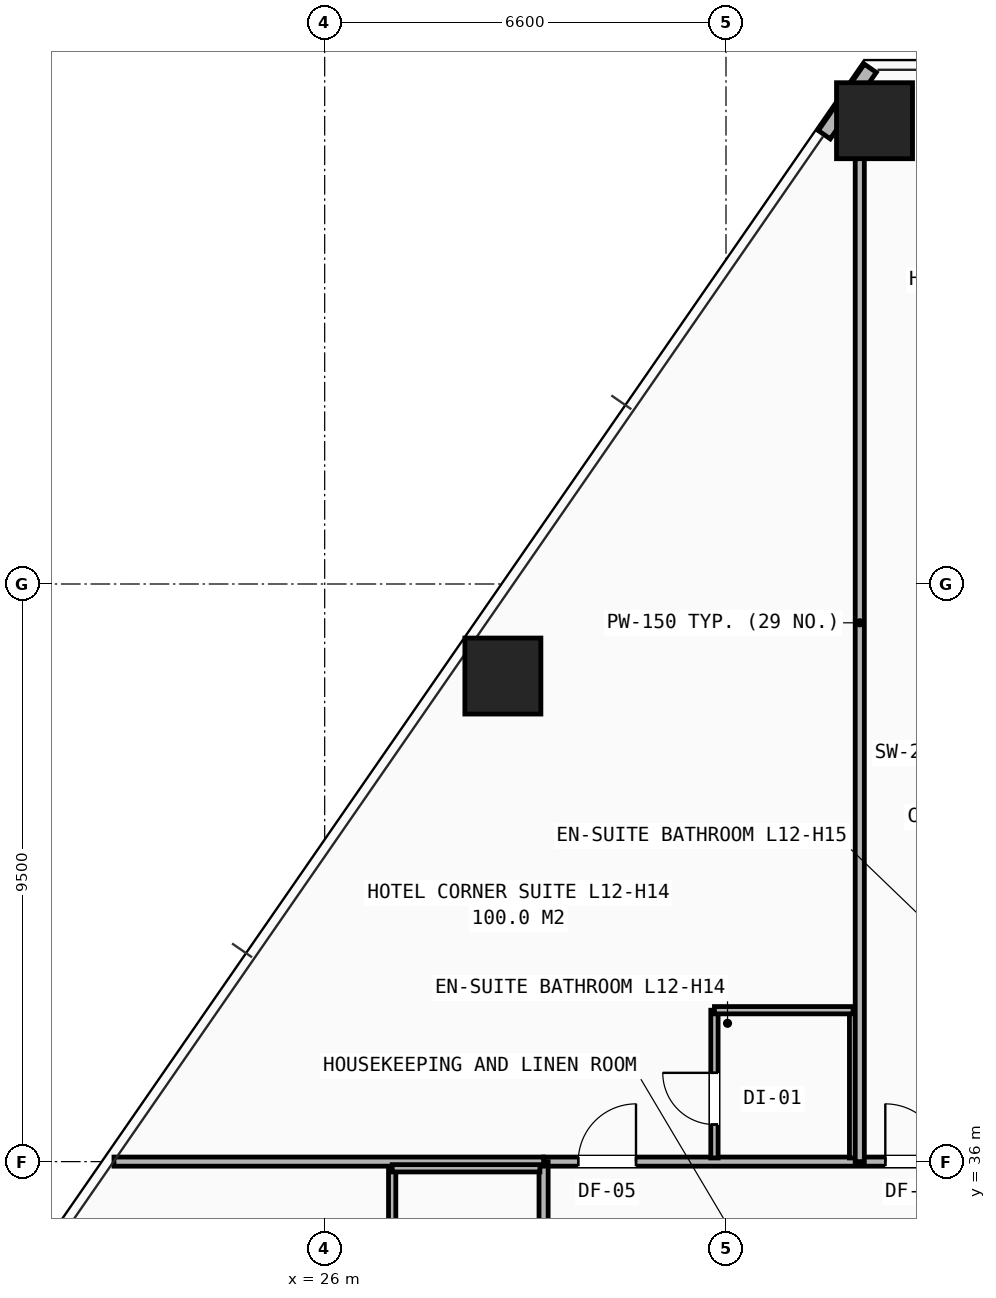
"""IFC4 building model, lengths in metres.
Left out: names, types, materials, properties, quantities, classifications, styles, units other than length and angle.
Written with IfcOpenShell. Run it as: python <this file> out.ifc"""

import sys

from ifc_helpers import new_model, si_unit, direction, frame, frame_2d, origin, origin_2d, place, context, subcontext, project, spatial, rectangle, hollow_rectangle, extrude, element, fill, save


model = new_model("IFC4")
c1 = context("Model", 3, precision=1e-05, world=origin(), true_north=direction((0.0, 1.0)))
c2 = subcontext(c1, "Body", "Model", "MODEL_VIEW")
j1 = project(units=[si_unit("LENGTHUNIT", "METRE"), si_unit("PLANEANGLEUNIT", "RADIAN")], contexts=[c1])
p1 = place(None, origin())
s1 = spatial("IfcSite", under=j1, at=p1, CompositionType="ELEMENT")
p2 = place(p1, origin())
s2 = spatial("IfcBuilding", under=s1, at=p2, CompositionType="ELEMENT")
p3 = place(p2, frame((0.0, 0.0, 46.4)))
s3 = spatial("IfcBuildingStorey", under=s2, at=p3, CompositionType="ELEMENT", Elevation=46.4)
for number, where, z_axis, x_axis in (
    (1, (35.042, 53.12, 0.0), (0.0, 0.0, 1.0), (1.0, 0.0, 0.0)),
    (2, (28.931, 43.986, 0.0), (0.0, 0.0, 1.0), (1.0, 0.0, 0.0)),
):
    element("IfcColumn", number, at=place(p3, frame(where, z_axis=z_axis, x_axis=x_axis)), inside=s3, PredefinedType="COLUMN", context=c2, shape_type="SweptSolid", body=[
        extrude(hollow_rectangle(XDim=1.25, YDim=1.25, WallThickness=0.08, at=origin_2d()), origin(), (0.0, 0.0, 1.0), 3.2),
    ])
p4 = place(p3, frame((34.973, 53.982, 0.0), z_axis=(0.0, 0.0, 1.0), x_axis=(-0.569066739455, -0.82229133891, 0.0)))
e3 = element("IfcWall", 3, at=p4, inside=s3, PredefinedType="SHEAR", context=c2, shape_type="SweptSolid", body=[
    extrude(rectangle(XDim=1.33, YDim=0.24, at=frame_2d((0.665, 0.0))), origin(), (0.0, 0.0, 1.0), 2.263),
])
p5 = place(p3, frame((29.6, 36.0, 0.0), z_axis=(0.0, 0.0, 1.0), x_axis=(1.0, 0.0, 0.0)))
e4 = element("IfcWall", 4, at=p5, inside=s3, PredefinedType="PARTITIONING", context=c2, shape_type="SweptSolid", body=[
    extrude(rectangle(XDim=10.175, YDim=0.15, at=frame_2d((5.087, 0.0))), origin(), (0.0, 0.0, 1.0), 2.98),
])
p6 = place(p5, frame((0.57, 0.0, 0.0)))
e5 = element("IfcOpeningElement", 5, at=p6, cuts=e4, PredefinedType="OPENING", context=c2, shape_type="SweptSolid", body=[
    extrude(rectangle(XDim=0.95, YDim=2.1, at=frame_2d((0.475, 1.05))), frame((0.0, 0.085, 0.0), z_axis=(0.0, -1.0, 0.0), x_axis=(1.0, 0.0, 0.0)), (0.0, 0.0, 1.0), 0.17),
])
p7 = place(p5, frame((5.62, 0.0, 0.0)))
e6 = element("IfcOpeningElement", 6, at=p7, cuts=e4, PredefinedType="OPENING", context=c2, shape_type="SweptSolid", body=[
    extrude(rectangle(XDim=0.95, YDim=2.1, at=frame_2d((0.475, 1.05))), frame((0.0, 0.085, 0.0), z_axis=(0.0, -1.0, 0.0), x_axis=(1.0, 0.0, 0.0)), (0.0, 0.0, 1.0), 0.17),
])
p8 = place(p3, frame((29.6, 14.1, 0.0), z_axis=(0.0, 0.0, 1.0), x_axis=(0.0, 1.0, 0.0)))
e7 = element("IfcWall", 7, at=p8, inside=s3, PredefinedType="PARTITIONING", context=c2, shape_type="SweptSolid", body=[
    extrude(rectangle(XDim=21.9, YDim=0.15, at=frame_2d((10.95, 0.0))), origin(), (0.0, 0.0, 1.0), 2.431),
])
p9 = place(p8, frame((0.42, 0.0, 0.0)))
e8 = element("IfcOpeningElement", 8, at=p9, cuts=e7, PredefinedType="OPENING", context=c2, shape_type="SweptSolid", body=[
    extrude(rectangle(XDim=0.95, YDim=2.1, at=frame_2d((0.475, 1.05))), frame((0.0, 0.085, 0.0), z_axis=(0.0, -1.0, 0.0), x_axis=(1.0, 0.0, 0.0)), (0.0, 0.0, 1.0), 0.17),
])
p10 = place(p8, frame((5.12, 0.0, 0.0)))
e9 = element("IfcOpeningElement", 9, at=p10, cuts=e7, PredefinedType="OPENING", context=c2, shape_type="SweptSolid", body=[
    extrude(rectangle(XDim=0.95, YDim=2.1, at=frame_2d((0.475, 1.05))), frame((0.0, 0.085, 0.0), z_axis=(0.0, -1.0, 0.0), x_axis=(1.0, 0.0, 0.0)), (0.0, 0.0, 1.0), 0.17),
])
p11 = place(p8, frame((10.12, 0.0, 0.0)))
e10 = element("IfcOpeningElement", 10, at=p11, cuts=e7, PredefinedType="OPENING", context=c2, shape_type="SweptSolid", body=[
    extrude(rectangle(XDim=0.95, YDim=2.1, at=frame_2d((0.475, 1.05))), frame((0.0, 0.085, 0.0), z_axis=(0.0, -1.0, 0.0), x_axis=(1.0, 0.0, 0.0)), (0.0, 0.0, 1.0), 0.17),
])
p12 = place(p8, frame((16.12, 0.0, 0.0)))
e11 = element("IfcOpeningElement", 11, at=p12, cuts=e7, PredefinedType="OPENING", context=c2, shape_type="SweptSolid", body=[
    extrude(rectangle(XDim=0.95, YDim=2.1, at=frame_2d((0.475, 1.05))), frame((0.0, 0.085, 0.0), z_axis=(0.0, -1.0, 0.0), x_axis=(1.0, 0.0, 0.0)), (0.0, 0.0, 1.0), 0.17),
])
p13 = place(p3, frame((22.535, 36.0, 0.0), z_axis=(0.0, 0.0, 1.0), x_axis=(1.0, 0.0, 0.0)))
e12 = element("IfcWall", 12, at=p13, inside=s3, PredefinedType="PARTITIONING", context=c2, shape_type="SweptSolid", body=[
    extrude(rectangle(XDim=7.065, YDim=0.15, at=frame_2d((3.533, 0.0))), origin(), (0.0, 0.0, 1.0), 2.268),
])
p14 = place(p3, frame((27.11, 33.61, 0.0), z_axis=(0.0, 0.0, 1.0), x_axis=(0.0, 1.0, 0.0)))
e13 = element("IfcWall", 13, at=p14, inside=s3, PredefinedType="PARTITIONING", context=c2, shape_type="SweptSolid", body=[
    extrude(rectangle(XDim=2.28, YDim=0.12, at=frame_2d((1.14, 0.0))), origin(), (0.0, 0.0, 1.0), 2.513),
])
p15 = place(p3, frame((27.11, 35.89, 0.0), z_axis=(0.0, 0.0, 1.0), x_axis=(1.0, 0.0, 0.0)))
e14 = element("IfcWall", 14, at=p15, inside=s3, PredefinedType="PARTITIONING", context=c2, shape_type="SweptSolid", body=[
    extrude(rectangle(XDim=2.43, YDim=0.12, at=frame_2d((1.215, 0.0))), origin(), (0.0, 0.0, 1.0), 2.513),
])
p16 = place(p3, frame((32.41, 36.06, 0.0), z_axis=(0.0, 0.0, 1.0), x_axis=(0.0, 1.0, 0.0)))
e15 = element("IfcWall", 15, at=p16, inside=s3, PredefinedType="PARTITIONING", context=c2, shape_type="SweptSolid", body=[
    extrude(rectangle(XDim=2.43, YDim=0.12, at=frame_2d((1.215, 0.0))), origin(), (0.0, 0.0, 1.0), 2.98),
])
p17 = place(p16, frame((0.55, 0.0, 0.0)))
e16 = element("IfcOpeningElement", 16, at=p17, cuts=e15, PredefinedType="OPENING", context=c2, shape_type="SweptSolid", body=[
    extrude(rectangle(XDim=0.85, YDim=2.05, at=frame_2d((0.425, 1.025))), frame((0.0, 0.07, 0.0), z_axis=(0.0, -1.0, 0.0), x_axis=(1.0, 0.0, 0.0)), (0.0, 0.0, 1.0), 0.14),
])
p18 = place(p3, frame((34.69, 36.06, 0.0), z_axis=(0.0, 0.0, 1.0), x_axis=(0.0, 1.0, 0.0)))
e17 = element("IfcWall", 17, at=p18, inside=s3, PredefinedType="PARTITIONING", context=c2, shape_type="SweptSolid", body=[
    extrude(rectangle(XDim=2.43, YDim=0.12, at=frame_2d((1.215, 0.0))), origin(), (0.0, 0.0, 1.0), 2.98),
])
p19 = place(p3, frame((32.41, 38.49, 0.0), z_axis=(0.0, 0.0, 1.0), x_axis=(1.0, 0.0, 0.0)))
e18 = element("IfcWall", 18, at=p19, inside=s3, PredefinedType="PARTITIONING", context=c2, shape_type="SweptSolid", body=[
    extrude(rectangle(XDim=2.28, YDim=0.12, at=frame_2d((1.14, 0.0))), origin(), (0.0, 0.0, 1.0), 2.98),
])
p20 = place(p3, frame((34.8, 36.0, 0.0), z_axis=(0.0, 0.0, 1.0), x_axis=(0.0, 1.0, 0.0)))
e19 = element("IfcWall", 19, at=p20, inside=s3, PredefinedType="PARTITIONING", context=c2, shape_type="SweptSolid", body=[
    extrude(rectangle(XDim=17.724, YDim=0.15, at=frame_2d((8.862, 0.0))), origin(), (0.0, 0.0, 1.0), 2.268),
])
p21 = place(p6, origin())
e20 = element("IfcDoor", 20, at=p21, inside=s3, OperationType="SINGLE_SWING_RIGHT", PredefinedType="DOOR", context=c2, shape_type="SweptSolid", body=[
    extrude(rectangle(XDim=0.95, YDim=2.1, at=frame_2d((0.475, 1.05))), frame((0.0, 0.025, 0.0), z_axis=(0.0, -1.0, 0.0), x_axis=(1.0, 0.0, 0.0)), (0.0, 0.0, 1.0), 0.05),
])
fill(e5, e20)
p22 = place(p17, origin())
e21 = element("IfcDoor", 21, at=p22, inside=s3, OperationType="SINGLE_SWING_RIGHT", PredefinedType="DOOR", context=c2, shape_type="SweptSolid", body=[
    extrude(rectangle(XDim=0.85, YDim=2.05, at=frame_2d((0.425, 1.025))), frame((0.0, 0.025, 0.0), z_axis=(0.0, -1.0, 0.0), x_axis=(1.0, 0.0, 0.0)), (0.0, 0.0, 1.0), 0.05),
])
fill(e16, e21)
p23 = place(p7, origin())
e22 = element("IfcDoor", 22, at=p23, inside=s3, OperationType="SINGLE_SWING_LEFT", PredefinedType="DOOR", context=c2, shape_type="SweptSolid", body=[
    extrude(rectangle(XDim=0.95, YDim=2.1, at=frame_2d((0.475, 1.05))), frame((0.0, 0.025, 0.0), z_axis=(0.0, -1.0, 0.0), x_axis=(1.0, 0.0, 0.0)), (0.0, 0.0, 1.0), 0.05),
])
fill(e6, e22)
save(model, sys.argv[1])
